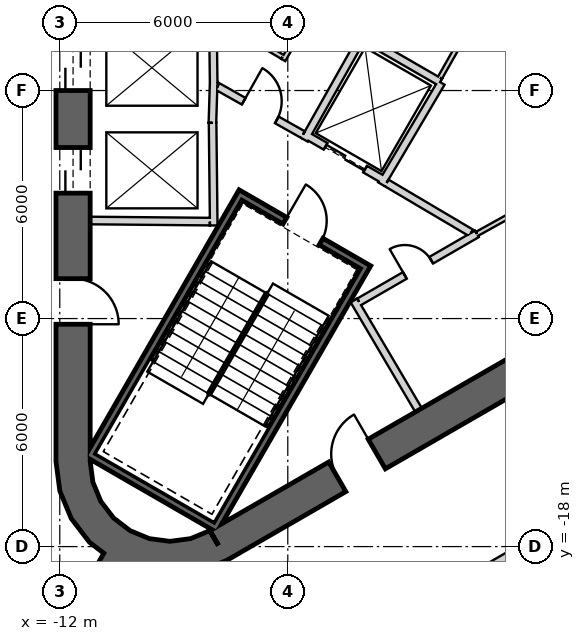
"""IFC4 building model, lengths in metres.
Left out: names, types, materials, properties, quantities, classifications, styles, units other than length and angle.
Written with IfcOpenShell. Run it as: python <this file> out.ifc"""

import sys

from ifc_helpers import new_model, si_unit, direction, frame, frame_2d, origin, place, context, subcontext, project, spatial, polyline, rectangle, outline, extrude, element, fill, save


model = new_model("IFC4")
c1 = context("Model", 3, precision=1e-05, world=origin(), true_north=direction((0.0, 1.0)))
c2 = subcontext(c1, "Body", "Model", "MODEL_VIEW")
j1 = project(units=[si_unit("LENGTHUNIT", "METRE"), si_unit("PLANEANGLEUNIT", "RADIAN")], contexts=[c1])
p1 = place(None, origin())
s1 = spatial("IfcSite", under=j1, at=p1, CompositionType="ELEMENT")
p2 = place(p1, origin())
s2 = spatial("IfcBuilding", under=s1, at=p2, CompositionType="ELEMENT")
p3 = place(p2, frame((0.0, 0.0, 333.8)))
s3 = spatial("IfcBuildingStorey", under=s2, at=p3, CompositionType="ELEMENT", Elevation=333.8)
p4 = place(p3, frame((-11.65, 15.762, 0.0), z_axis=(0.0, 0.0, 1.0), x_axis=(0.0, -1.0, 0.0)))
e1 = element("IfcWall", 1, at=p4, inside=s3, PredefinedType="SHEAR", context=c2, shape_type="SweptSolid", body=[
    extrude(rectangle(XDim=31.523, YDim=0.9, at=frame_2d((15.762, 0.0))), origin(), (0.0, 0.0, 1.0), 3.9),
])
p5 = place(p4, frame((7.062, 0.0, 0.0)))
e2 = element("IfcOpeningElement", 2, at=p5, cuts=e1, PredefinedType="OPENING", context=c2, shape_type="SweptSolid", body=[
    extrude(rectangle(XDim=1.2, YDim=2.4, at=frame_2d((0.6, 1.2))), frame((0.0, 0.46, 0.0), z_axis=(0.0, -1.0, 0.0), x_axis=(1.0, 0.0, 0.0)), (0.0, 0.0, 1.0), 0.92),
])
p6 = place(p4, frame((9.762, 0.0, 0.0)))
e3 = element("IfcOpeningElement", 3, at=p6, cuts=e1, PredefinedType="OPENING", context=c2, shape_type="SweptSolid", body=[
    extrude(rectangle(XDim=1.2, YDim=2.4, at=frame_2d((0.6, 1.2))), frame((0.0, 0.46, 0.0), z_axis=(0.0, -1.0, 0.0), x_axis=(1.0, 0.0, 0.0)), (0.0, 0.0, 1.0), 0.92),
])
p7 = place(p4, frame((12.462, 0.0, 0.0)))
e4 = element("IfcOpeningElement", 4, at=p7, cuts=e1, PredefinedType="OPENING", context=c2, shape_type="SweptSolid", body=[
    extrude(rectangle(XDim=1.2, YDim=2.4, at=frame_2d((0.6, 1.2))), frame((0.0, 0.46, 0.0), z_axis=(0.0, -1.0, 0.0), x_axis=(1.0, 0.0, 0.0)), (0.0, 0.0, 1.0), 0.92),
])
p8 = place(p4, frame((15.162, 0.0, 0.0)))
e5 = element("IfcOpeningElement", 5, at=p8, cuts=e1, PredefinedType="OPENING", context=c2, shape_type="SweptSolid", body=[
    extrude(rectangle(XDim=1.2, YDim=2.4, at=frame_2d((0.6, 1.2))), frame((0.0, 0.46, 0.0), z_axis=(0.0, -1.0, 0.0), x_axis=(1.0, 0.0, 0.0)), (0.0, 0.0, 1.0), 0.92),
])
p9 = place(p4, frame((17.862, 0.0, 0.0)))
e6 = element("IfcOpeningElement", 6, at=p9, cuts=e1, PredefinedType="OPENING", context=c2, shape_type="SweptSolid", body=[
    extrude(rectangle(XDim=1.2, YDim=2.4, at=frame_2d((0.6, 1.2))), frame((0.0, 0.46, 0.0), z_axis=(0.0, -1.0, 0.0), x_axis=(1.0, 0.0, 0.0)), (0.0, 0.0, 1.0), 0.92),
])
p10 = place(p4, frame((20.562, 0.0, 0.0)))
e7 = element("IfcOpeningElement", 7, at=p10, cuts=e1, PredefinedType="OPENING", context=c2, shape_type="SweptSolid", body=[
    extrude(rectangle(XDim=1.2, YDim=2.4, at=frame_2d((0.6, 1.2))), frame((0.0, 0.46, 0.0), z_axis=(0.0, -1.0, 0.0), x_axis=(1.0, 0.0, 0.0)), (0.0, 0.0, 1.0), 0.92),
])
p11 = place(p4, frame((23.262, 0.0, 0.0)))
e8 = element("IfcOpeningElement", 8, at=p11, cuts=e1, PredefinedType="OPENING", context=c2, shape_type="SweptSolid", body=[
    extrude(rectangle(XDim=1.2, YDim=2.4, at=frame_2d((0.6, 1.2))), frame((0.0, 0.46, 0.0), z_axis=(0.0, -1.0, 0.0), x_axis=(1.0, 0.0, 0.0)), (0.0, 0.0, 1.0), 0.92),
])
p12 = place(p4, frame((3.612, 0.0, 0.0)))
e9 = element("IfcOpeningElement", 9, at=p12, cuts=e1, PredefinedType="OPENING", context=c2, shape_type="SweptSolid", body=[
    extrude(rectangle(XDim=1.2, YDim=2.4, at=frame_2d((0.6, 1.2))), frame((0.0, 0.46, 0.0), z_axis=(0.0, -1.0, 0.0), x_axis=(1.0, 0.0, 0.0)), (0.0, 0.0, 1.0), 0.92),
])
p13 = place(p4, frame((26.712, 0.0, 0.0)))
e10 = element("IfcOpeningElement", 10, at=p13, cuts=e1, PredefinedType="OPENING", context=c2, shape_type="SweptSolid", body=[
    extrude(rectangle(XDim=1.2, YDim=2.4, at=frame_2d((0.6, 1.2))), frame((0.0, 0.46, 0.0), z_axis=(0.0, -1.0, 0.0), x_axis=(1.0, 0.0, 0.0)), (0.0, 0.0, 1.0), 0.92),
])
p14 = place(p3, frame((-7.825, -17.97, 0.0), z_axis=(0.0, 0.0, 1.0), x_axis=(0.866028369851, 0.499994862586, 0.0)))
e11 = element("IfcWall", 11, at=p14, inside=s3, PredefinedType="SHEAR", context=c2, shape_type="SweptSolid", body=[
    extrude(rectangle(XDim=31.523, YDim=0.9, at=frame_2d((15.762, 0.0))), origin(), (0.0, 0.0, 1.0), 3.9),
])
p15 = place(p14, frame((17.862, 0.0, 0.0)))
e12 = element("IfcOpeningElement", 12, at=p15, cuts=e11, PredefinedType="OPENING", context=c2, shape_type="SweptSolid", body=[
    extrude(rectangle(XDim=1.2, YDim=2.4, at=frame_2d((0.6, 1.2))), frame((0.0, 0.46, 0.0), z_axis=(0.0, -1.0, 0.0), x_axis=(1.0, 0.0, 0.0)), (0.0, 0.0, 1.0), 0.92),
])
p16 = place(p14, frame((20.562, 0.0, 0.0)))
e13 = element("IfcOpeningElement", 13, at=p16, cuts=e11, PredefinedType="OPENING", context=c2, shape_type="SweptSolid", body=[
    extrude(rectangle(XDim=1.2, YDim=2.4, at=frame_2d((0.6, 1.2))), frame((0.0, 0.46, 0.0), z_axis=(0.0, -1.0, 0.0), x_axis=(1.0, 0.0, 0.0)), (0.0, 0.0, 1.0), 0.92),
])
p17 = place(p14, frame((26.712, 0.0, 0.0)))
e14 = element("IfcOpeningElement", 14, at=p17, cuts=e11, PredefinedType="OPENING", context=c2, shape_type="SweptSolid", body=[
    extrude(rectangle(XDim=1.2, YDim=2.4, at=frame_2d((0.6, 1.2))), frame((0.0, 0.46, 0.0), z_axis=(0.0, -1.0, 0.0), x_axis=(1.0, 0.0, 0.0)), (0.0, 0.0, 1.0), 0.92),
])
p18 = place(p14, frame((3.612, 0.0, 0.0)))
e15 = element("IfcOpeningElement", 15, at=p18, cuts=e11, PredefinedType="OPENING", context=c2, shape_type="SweptSolid", body=[
    extrude(rectangle(XDim=1.2, YDim=2.4, at=frame_2d((0.6, 1.2))), frame((0.0, 0.46, 0.0), z_axis=(0.0, -1.0, 0.0), x_axis=(1.0, 0.0, 0.0)), (0.0, 0.0, 1.0), 0.92),
])
p19 = place(p3, origin())
e16 = element("IfcWall", 16, at=p19, inside=s3, PredefinedType="SHEAR", context=c2, shape_type="SweptSolid", body=[
    extrude(outline(polyline([(-12.1, -15.762), (-11.998, -16.538), (-11.698, -17.262), (-11.221, -17.883), (-10.6, -18.36), (-9.876, -18.659), (-9.1, -18.762), (-8.323, -18.659), (-7.6, -18.36), (-8.05, -17.58), (-8.556, -17.79), (-9.1, -17.862), (-9.644, -17.79), (-10.15, -17.58), (-10.585, -17.247), (-10.919, -16.812), (-11.128, -16.305), (-11.2, -15.762), (-12.1, -15.762)])), origin(), (0.0, 0.0, 1.0), 3.9),
])
p20 = place(p3, frame((-10.575, -18.316, 0.0), z_axis=(0.0, 0.0, 1.0), x_axis=(-0.499998447599, -0.866026300061, 0.0)))
e17 = element("IfcWall", 17, at=p20, inside=s3, PredefinedType="SHEAR", context=c2, shape_type="SweptSolid", body=[
    extrude(rectangle(XDim=8.321, YDim=0.6, at=frame_2d((4.16, 0.0))), origin(), (0.0, 0.0, 1.0), 3.9),
])
p21 = place(p20, frame((1.4, 0.0, 0.0)))
e18 = element("IfcOpeningElement", 18, at=p21, cuts=e17, PredefinedType="OPENING", context=c2, shape_type="SweptSolid", body=[
    extrude(rectangle(XDim=1.4, YDim=2.4, at=frame_2d((0.7, 1.2))), frame((0.0, 0.31, 0.0), z_axis=(0.0, -1.0, 0.0), x_axis=(1.0, 0.0, 0.0)), (0.0, 0.0, 1.0), 0.62),
])
p22 = place(p3, frame((-7.95, -5.772, 0.0), z_axis=(0.0, 0.0, 1.0), x_axis=(-0.030803413295, -0.999525462272, 0.0)))
e19 = element("IfcWall", 19, at=p22, inside=s3, PredefinedType="PLUMBINGWALL", context=c2, shape_type="SweptSolid", body=[
    extrude(rectangle(XDim=1.078, YDim=0.2, at=frame_2d((0.539, 0.0))), origin(), (0.0, 0.0, 1.0), 3.6),
])
p23 = place(p3, frame((-7.971, -4.05, 0.0), z_axis=(0.0, 0.0, 1.0), x_axis=(0.012042535896, -0.999927486035, 0.0)))
e20 = element("IfcWall", 20, at=p23, inside=s3, PredefinedType="PLUMBINGWALL", context=c2, shape_type="SweptSolid", body=[
    extrude(rectangle(XDim=1.845, YDim=0.2, at=frame_2d((0.922, 0.0))), origin(), (0.0, 0.0, 1.0), 3.6),
])
p24 = place(p3, frame((-7.979, -6.85, 0.0), z_axis=(0.0, 0.0, 1.0), x_axis=(0.011121475088, -0.999938154483, 0.0)))
e21 = element("IfcWall", 21, at=p24, inside=s3, PredefinedType="PLUMBINGWALL", context=c2, shape_type="SweptSolid", body=[
    extrude(rectangle(XDim=2.7, YDim=0.2, at=frame_2d((1.35, 0.0))), origin(), (0.0, 0.0, 1.0), 3.6),
])
p25 = place(p3, frame((-8.05, -9.449, 0.0), z_axis=(0.0, 0.0, 1.0), x_axis=(-0.999957467379, 0.009222983926, 0.0)))
e22 = element("IfcWall", 22, at=p25, inside=s3, PredefinedType="PLUMBINGWALL", context=c2, shape_type="SweptSolid", body=[
    extrude(rectangle(XDim=3.15, YDim=0.2, at=frame_2d((1.575, 0.0))), origin(), (0.0, 0.0, 1.0), 3.6),
])
p26 = place(p3, frame((-3.905, -10.563, -0.3), z_axis=(0.0, 0.0, 1.0), x_axis=(-0.500012932018, -0.866017937352, 0.0)))
e23 = element("IfcWall", 23, at=p26, inside=s3, PredefinedType="SHEAR", context=c2, shape_type="SweptSolid", body=[
    extrude(rectangle(XDim=8.1, YDim=0.2, at=frame_2d((4.05, 0.0))), origin(), (0.0, 0.0, 1.0), 3.9),
])
p27 = place(p3, frame((-11.282, -15.541, -0.3), z_axis=(0.0, 0.0, 1.0), x_axis=(0.866000483506, -0.500043160704, 0.0)))
e24 = element("IfcWall", 24, at=p27, inside=s3, PredefinedType="SHEAR", context=c2, shape_type="SweptSolid", body=[
    extrude(rectangle(XDim=3.8, YDim=0.2, at=frame_2d((1.9, 0.0))), origin(), (0.0, 0.0, 1.0), 3.9),
])
p28 = place(p3, frame((-7.196, -8.663, -0.3), z_axis=(0.0, 0.0, 1.0), x_axis=(-0.499997992926, -0.866026562566, 0.0)))
e25 = element("IfcWall", 25, at=p28, inside=s3, PredefinedType="SHEAR", context=c2, shape_type="SweptSolid", body=[
    extrude(rectangle(XDim=7.9, YDim=0.2, at=frame_2d((3.95, 0.0))), origin(), (0.0, 0.0, 1.0), 3.9),
])
p29 = place(p3, frame((-4.041, -10.599, -0.3), z_axis=(0.0, 0.0, 1.0), x_axis=(-0.866047807691, 0.499961193289, 0.0)))
e26 = element("IfcWall", 26, at=p29, inside=s3, PredefinedType="SHEAR", context=c2, shape_type="SweptSolid", body=[
    extrude(rectangle(XDim=3.6, YDim=0.2, at=frame_2d((1.8, 0.0))), origin(), (0.0, 0.0, 1.0), 3.9),
])
p30 = place(p29, frame((1.25, 0.0, 0.3)))
e27 = element("IfcOpeningElement", 27, at=p30, cuts=e26, PredefinedType="OPENING", context=c2, shape_type="SweptSolid", body=[
    extrude(rectangle(XDim=1.1, YDim=2.1, at=frame_2d((0.55, 1.05))), frame((0.0, 0.11, 0.0), z_axis=(0.0, -1.0, 0.0), x_axis=(1.0, 0.0, 0.0)), (0.0, 0.0, 1.0), 0.22),
])
p31 = place(p3, frame((-3.446, -8.368, 0.0), z_axis=(0.0, 0.0, 1.0), x_axis=(-0.866024647952, 0.500001309137, 0.0)))
e28 = element("IfcWall", 28, at=p31, inside=s3, PredefinedType="PLUMBINGWALL", context=c2, shape_type="SweptSolid", body=[
    extrude(rectangle(XDim=2.4, YDim=0.2, at=frame_2d((1.2, 0.0))), origin(), (0.0, 0.0, 1.0), 3.6),
])
p32 = place(p31, frame((0.6, 0.0, 0.0)))
e29 = element("IfcOpeningElement", 29, at=p32, cuts=e28, PredefinedType="OPENING", context=c2, shape_type="SweptSolid", body=[
    extrude(rectangle(XDim=1.2, YDim=2.4, at=frame_2d((0.6, 1.2))), frame((0.0, 0.11, 0.0), z_axis=(0.0, -1.0, 0.0), x_axis=(1.0, 0.0, 0.0)), (0.0, 0.0, 1.0), 0.22),
])
p33 = place(p3, frame((-1.961, -5.796, 0.0), z_axis=(0.0, 0.0, 1.0), x_axis=(-0.508647062354, -0.860975125052, 0.0)))
e30 = element("IfcWall", 30, at=p33, inside=s3, PredefinedType="PLUMBINGWALL", context=c2, shape_type="SweptSolid", body=[
    extrude(rectangle(XDim=3.1, YDim=0.2, at=frame_2d((1.55, 0.0))), origin(), (0.0, 0.0, 1.0), 3.6),
])
p34 = place(p3, frame((-3.99, -4.509, 0.0), z_axis=(0.0, 0.0, 1.0), x_axis=(-0.491358283181, -0.870957540612, 0.0)))
e31 = element("IfcWall", 31, at=p34, inside=s3, PredefinedType="PLUMBINGWALL", context=c2, shape_type="SweptSolid", body=[
    extrude(rectangle(XDim=3.2, YDim=0.2, at=frame_2d((1.6, 0.0))), origin(), (0.0, 0.0, 1.0), 3.6),
])
p35 = place(p3, frame((-3.953, -4.646, 0.0), z_axis=(0.0, 0.0, 1.0), x_axis=(0.866065302921, -0.4999308863, 0.0)))
e32 = element("IfcWall", 32, at=p35, inside=s3, PredefinedType="PLUMBINGWALL", context=c2, shape_type="SweptSolid", body=[
    extrude(rectangle(XDim=2.264, YDim=0.2, at=frame_2d((1.132, 0.0))), origin(), (0.0, 0.0, 1.0), 3.6),
])
p36 = place(p3, frame((-4.26, -11.524, 0.0), z_axis=(0.0, 0.0, 1.0), x_axis=(0.507997497166, -0.861358544901, 0.0)))
e33 = element("IfcWall", 33, at=p36, inside=s3, PredefinedType="PARTITIONING", context=c2, shape_type="SweptSolid", body=[
    extrude(rectangle(XDim=3.35, YDim=0.2, at=frame_2d((1.675, 0.0))), origin(), (0.0, 0.0, 1.0), 3.6),
])
p37 = place(p3, frame((-1.024, -9.771, 0.0), z_axis=(0.0, 0.0, 1.0), x_axis=(-0.866029903013, -0.499992207027, 0.0)))
e34 = element("IfcWall", 34, at=p37, inside=s3, PredefinedType="PARTITIONING", context=c2, shape_type="SweptSolid", body=[
    extrude(rectangle(XDim=3.578, YDim=0.2, at=frame_2d((1.789, 0.0))), origin(), (0.0, 0.0, 1.0), 3.6),
])
p38 = place(p37, frame((1.389, 0.0, 0.0)))
e35 = element("IfcOpeningElement", 35, at=p38, cuts=e34, PredefinedType="OPENING", context=c2, shape_type="SweptSolid", body=[
    extrude(rectangle(XDim=0.8, YDim=2.1, at=frame_2d((0.4, 1.05))), frame((0.0, 0.11, 0.0), z_axis=(0.0, -1.0, 0.0), x_axis=(1.0, 0.0, 0.0)), (0.0, 0.0, 1.0), 0.22),
])
p39 = place(p3, frame((-1.023, -9.772, 0.0), z_axis=(0.0, 0.0, 1.0), x_axis=(0.874290944206, 0.485402250592, 0.0)))
e36 = element("IfcWall", 36, at=p39, inside=s3, PredefinedType="PARTITIONING", context=c2, shape_type="SweptSolid", body=[
    extrude(rectangle(XDim=1.723, YDim=0.12, at=frame_2d((0.861, 0.0))), origin(), (0.0, 0.0, 1.0), 3.6),
])
p40 = place(p3, frame((-3.401, -8.43, 0.0), z_axis=(0.0, 0.0, 1.0), x_axis=(0.860630814782, -0.509229418482, 0.0)))
e37 = element("IfcWall", 37, at=p40, inside=s3, PredefinedType="PARTITIONING", context=c2, shape_type="SweptSolid", body=[
    extrude(rectangle(XDim=2.582, YDim=0.2, at=frame_2d((1.291, 0.0))), origin(), (0.0, 0.0, 1.0), 3.6),
])
p41 = place(p3, frame((-7.849, -5.894, 0.0), z_axis=(0.0, 0.0, 1.0), x_axis=(0.871363259478, -0.490638431059, 0.0)))
e38 = element("IfcWall", 38, at=p41, inside=s3, PredefinedType="PARTITIONING", context=c2, shape_type="SweptSolid", body=[
    extrude(rectangle(XDim=2.581, YDim=0.2, at=frame_2d((1.291, 0.0))), origin(), (0.0, 0.0, 1.0), 3.6),
])
p42 = place(p41, frame((0.791, 0.0, 0.0)))
e39 = element("IfcOpeningElement", 39, at=p42, cuts=e38, PredefinedType="OPENING", context=c2, shape_type="SweptSolid", body=[
    extrude(rectangle(XDim=1.0, YDim=2.1, at=frame_2d((0.5, 1.05))), frame((0.0, 0.11, 0.0), z_axis=(0.0, -1.0, 0.0), x_axis=(1.0, 0.0, 0.0)), (0.0, 0.0, 1.0), 0.22),
])
p43 = place(p3, frame((0.029, -2.099, 0.0), z_axis=(0.0, 0.0, 1.0), x_axis=(-0.49376265119, -0.869596713592, 0.0)))
e40 = element("IfcWall", 40, at=p43, inside=s3, PredefinedType="PARTITIONING", context=c2, shape_type="SweptSolid", body=[
    extrude(rectangle(XDim=4.097, YDim=0.12, at=frame_2d((2.048, 0.0))), origin(), (0.0, 0.0, 1.0), 3.6),
])
p44 = place(p43, frame((1.7, 0.0, 0.0)))
e41 = element("IfcOpeningElement", 41, at=p44, cuts=e40, PredefinedType="OPENING", context=c2, shape_type="SweptSolid", body=[
    extrude(rectangle(XDim=0.8, YDim=2.1, at=frame_2d((0.4, 1.05))), frame((0.0, 0.07, 0.0), z_axis=(0.0, -1.0, 0.0), x_axis=(1.0, 0.0, 0.0)), (0.0, 0.0, 1.0), 0.14),
])
p45 = place(p3, frame((-6.118, -5.197, 0.0), z_axis=(0.0, 0.0, 1.0), x_axis=(0.499979045085, 0.866037501772, 0.0)))
e42 = element("IfcWall", 42, at=p45, inside=s3, PredefinedType="PARTITIONING", context=c2, shape_type="SweptSolid", body=[
    extrude(rectangle(XDim=3.679, YDim=0.12, at=frame_2d((1.839, 0.0))), origin(), (0.0, 0.0, 1.0), 3.6),
])
p46 = place(p45, frame((1.16, 0.0, 0.0)))
e43 = element("IfcOpeningElement", 43, at=p46, cuts=e42, PredefinedType="OPENING", context=c2, shape_type="SweptSolid", body=[
    extrude(rectangle(XDim=0.8, YDim=2.1, at=frame_2d((0.4, 1.05))), frame((0.0, 0.07, 0.0), z_axis=(0.0, -1.0, 0.0), x_axis=(1.0, 0.0, 0.0)), (0.0, 0.0, 1.0), 0.14),
])
p47 = place(p3, frame((-7.95, -4.041, 0.0), z_axis=(0.0, 0.0, 1.0), x_axis=(0.860112457103, -0.510104461004, 0.0)))
e44 = element("IfcWall", 44, at=p47, inside=s3, PredefinedType="PARTITIONING", context=c2, shape_type="SweptSolid", body=[
    extrude(rectangle(XDim=2.104, YDim=0.12, at=frame_2d((1.052, 0.0))), origin(), (0.0, 0.0, 1.0), 3.6),
])
p48 = place(p3, frame((-6.505, -21.885, 0.0), z_axis=(0.0, 0.0, 1.0), x_axis=(0.86602457258, 0.500001439686, 0.0)))
e45 = element("IfcWall", 45, at=p48, inside=s3, PredefinedType="PARTITIONING", context=c2, shape_type="SweptSolid", body=[
    extrude(rectangle(XDim=32.952, YDim=0.2, at=frame_2d((16.476, 0.0))), origin(), (0.0, 0.0, 1.0), 2.97),
])
p49 = place(p48, frame((28.061, 0.0, 0.0)))
e46 = element("IfcOpeningElement", 46, at=p49, cuts=e45, PredefinedType="OPENING", context=c2, shape_type="SweptSolid", body=[
    extrude(rectangle(XDim=1.0, YDim=2.1, at=frame_2d((0.5, 1.05))), frame((0.0, 0.11, 0.0), z_axis=(0.0, -1.0, 0.0), x_axis=(1.0, 0.0, 0.0)), (0.0, 0.0, 1.0), 0.22),
])
p50 = place(p48, frame((16.137, 0.0, 0.0)))
e47 = element("IfcOpeningElement", 47, at=p50, cuts=e45, PredefinedType="OPENING", context=c2, shape_type="SweptSolid", body=[
    extrude(rectangle(XDim=1.0, YDim=2.1, at=frame_2d((0.5, 1.05))), frame((0.0, 0.11, 0.0), z_axis=(0.0, -1.0, 0.0), x_axis=(1.0, 0.0, 0.0)), (0.0, 0.0, 1.0), 0.22),
])
p51 = place(p48, frame((4.101, 0.0, 0.0)))
e48 = element("IfcOpeningElement", 48, at=p51, cuts=e45, PredefinedType="OPENING", context=c2, shape_type="SweptSolid", body=[
    extrude(rectangle(XDim=1.0, YDim=2.1, at=frame_2d((0.5, 1.05))), frame((0.0, 0.11, 0.0), z_axis=(0.0, -1.0, 0.0), x_axis=(1.0, 0.0, 0.0)), (0.0, 0.0, 1.0), 0.22),
])
p52 = place(p30, origin())
e49 = element("IfcDoor", 49, at=p52, inside=s3, OperationType="SINGLE_SWING_RIGHT", PredefinedType="USERDEFINED", context=c2, shape_type="SweptSolid", body=[
    extrude(rectangle(XDim=1.1, YDim=2.1, at=frame_2d((0.55, 1.05))), frame((0.0, 0.025, 0.0), z_axis=(0.0, -1.0, 0.0), x_axis=(1.0, 0.0, 0.0)), (0.0, 0.0, 1.0), 0.05),
])
fill(e27, e49)
p53 = place(p42, origin())
e50 = element("IfcDoor", 50, at=p53, inside=s3, OperationType="SINGLE_SWING_RIGHT", PredefinedType="USERDEFINED", context=c2, shape_type="SweptSolid", body=[
    extrude(rectangle(XDim=1.0, YDim=2.1, at=frame_2d((0.5, 1.05))), frame((0.0, 0.025, 0.0), z_axis=(0.0, -1.0, 0.0), x_axis=(1.0, 0.0, 0.0)), (0.0, 0.0, 1.0), 0.05),
])
fill(e39, e50)
p54 = place(p32, origin())
e51 = element("IfcDoor", 51, at=p54, inside=s3, OperationType="SLIDING_TO_LEFT", PredefinedType="USERDEFINED", context=c2, shape_type="SweptSolid", body=[
    extrude(rectangle(XDim=1.2, YDim=2.4, at=frame_2d((0.6, 1.2))), frame((0.0, 0.025, 0.0), z_axis=(0.0, -1.0, 0.0), x_axis=(1.0, 0.0, 0.0)), (0.0, 0.0, 1.0), 0.05),
])
fill(e29, e51)
p55 = place(p38, origin())
e52 = element("IfcDoor", 52, at=p55, inside=s3, OperationType="SINGLE_SWING_RIGHT", PredefinedType="USERDEFINED", context=c2, shape_type="SweptSolid", body=[
    extrude(rectangle(XDim=0.8, YDim=2.1, at=frame_2d((0.4, 1.05))), frame((0.0, 0.025, 0.0), z_axis=(0.0, -1.0, 0.0), x_axis=(1.0, 0.0, 0.0)), (0.0, 0.0, 1.0), 0.05),
])
fill(e35, e52)
p56 = place(p10, origin())
e53 = element("IfcDoor", 53, at=p56, inside=s3, OperationType="SLIDING_TO_LEFT", PredefinedType="USERDEFINED", context=c2, shape_type="SweptSolid", body=[
    extrude(rectangle(XDim=1.2, YDim=2.4, at=frame_2d((0.6, 1.2))), frame((0.0, 0.025, 0.0), z_axis=(0.0, -1.0, 0.0), x_axis=(1.0, 0.0, 0.0)), (0.0, 0.0, 1.0), 0.05),
])
fill(e7, e53)
p57 = place(p11, origin())
e54 = element("IfcDoor", 54, at=p57, inside=s3, OperationType="SLIDING_TO_LEFT", PredefinedType="USERDEFINED", context=c2, shape_type="SweptSolid", body=[
    extrude(rectangle(XDim=1.2, YDim=2.4, at=frame_2d((0.6, 1.2))), frame((0.0, 0.025, 0.0), z_axis=(0.0, -1.0, 0.0), x_axis=(1.0, 0.0, 0.0)), (0.0, 0.0, 1.0), 0.05),
])
fill(e8, e54)
p58 = place(p13, origin())
e55 = element("IfcDoor", 55, at=p58, inside=s3, OperationType="SINGLE_SWING_LEFT", PredefinedType="USERDEFINED", context=c2, shape_type="SweptSolid", body=[
    extrude(rectangle(XDim=1.2, YDim=2.4, at=frame_2d((0.6, 1.2))), frame((0.0, 0.025, 0.0), z_axis=(0.0, -1.0, 0.0), x_axis=(1.0, 0.0, 0.0)), (0.0, 0.0, 1.0), 0.05),
])
fill(e10, e55)
p59 = place(p18, origin())
e56 = element("IfcDoor", 56, at=p59, inside=s3, OperationType="SINGLE_SWING_LEFT", PredefinedType="USERDEFINED", context=c2, shape_type="SweptSolid", body=[
    extrude(rectangle(XDim=1.2, YDim=2.4, at=frame_2d((0.6, 1.2))), frame((0.0, 0.025, 0.0), z_axis=(0.0, -1.0, 0.0), x_axis=(1.0, 0.0, 0.0)), (0.0, 0.0, 1.0), 0.05),
])
fill(e15, e56)
save(model, sys.argv[1])
